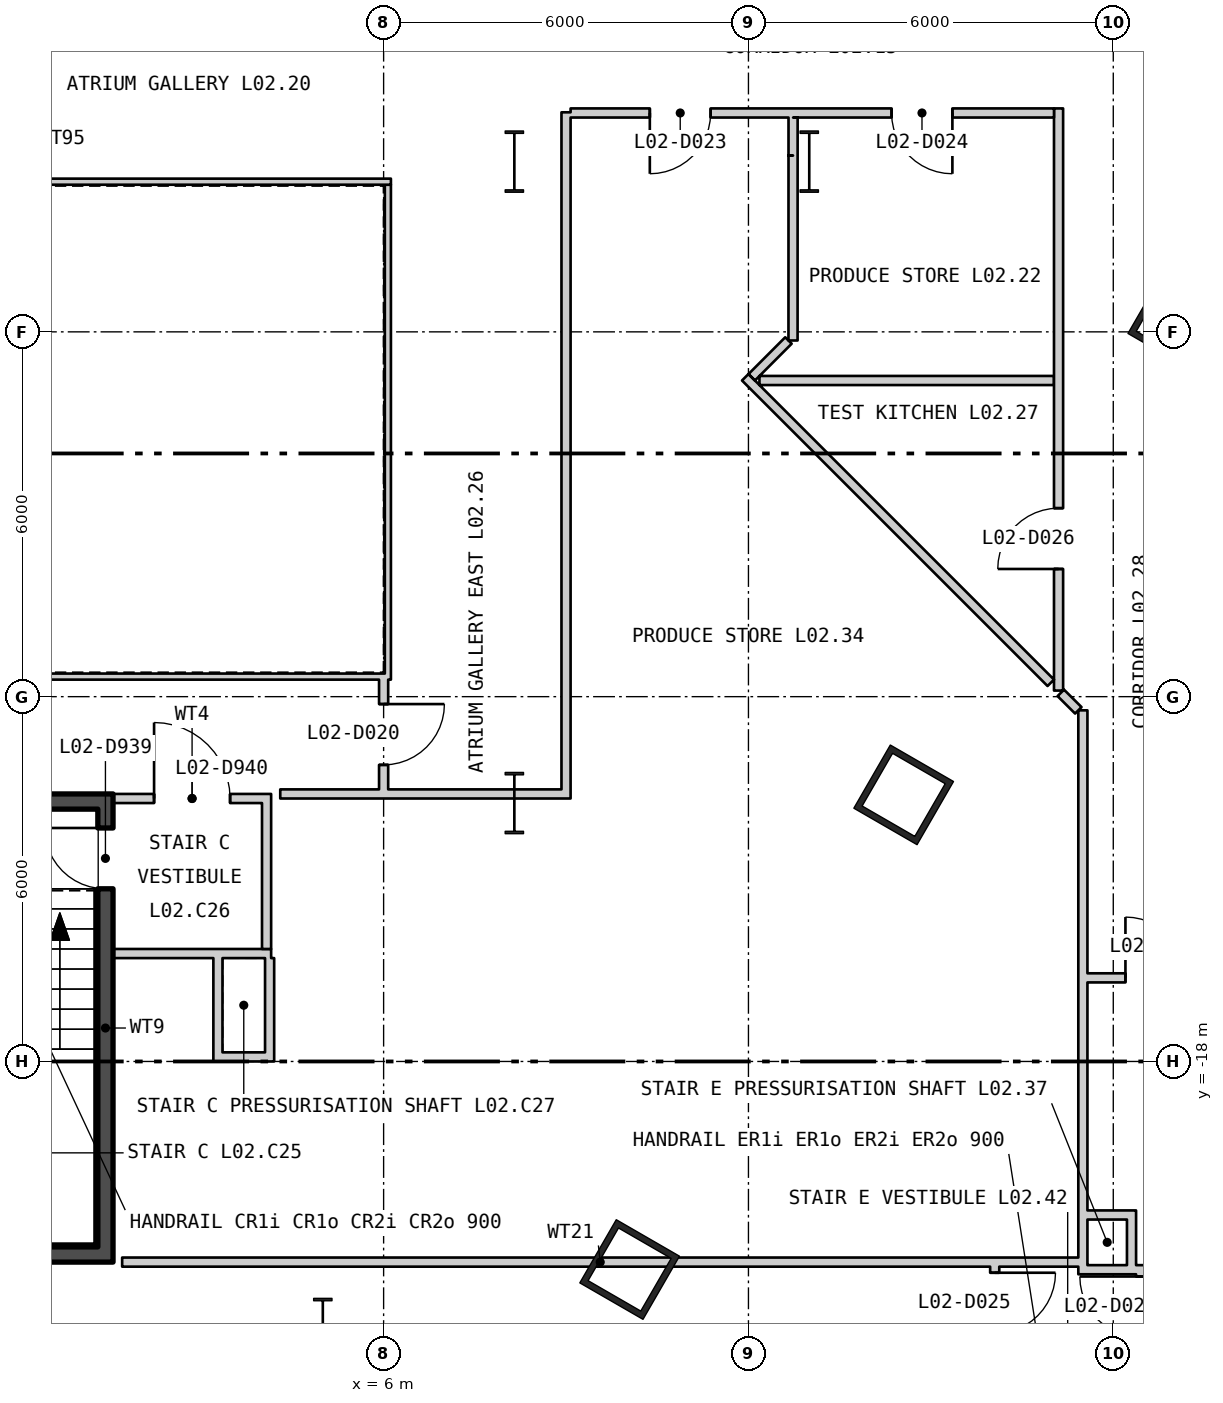
"""IFC4 building model, lengths in metres.
Left out: names, types, materials, properties, quantities, classifications, styles, units other than length and angle.
Written with IfcOpenShell. Run it as: python <this file> out.ifc"""

import sys

from ifc_helpers import new_model, si_unit, direction, frame, frame_2d, origin, origin_2d, place, context, subcontext, project, spatial, rectangle, hollow_rectangle, i_section, extrude, element, fill, save


model = new_model("IFC4")
c1 = context("Model", 3, precision=1e-05, world=origin(), true_north=direction((0.0, 1.0)))
c2 = subcontext(c1, "Body", "Model", "MODEL_VIEW")
j1 = project(units=[si_unit("LENGTHUNIT", "METRE"), si_unit("PLANEANGLEUNIT", "RADIAN")], contexts=[c1])
p1 = place(None, origin())
s1 = spatial("IfcSite", under=j1, at=p1, CompositionType="ELEMENT")
p2 = place(p1, origin())
s2 = spatial("IfcBuilding", under=s1, at=p2, CompositionType="ELEMENT")
p3 = place(p2, frame((0.0, 0.0, 13.5)))
s3 = spatial("IfcBuildingStorey", under=s2, at=p3, CompositionType="ELEMENT", Elevation=13.5)
for number, where, z_axis, x_axis in (
    (1, (10.046, -21.422, 0.0), (0.0, 0.0, 1.0), (0.5, 0.866, 0.0)),
    (2, (14.553, -13.615, 0.0), (0.0, 0.0, 1.0), (0.5, 0.866, 0.0)),
    (3, (19.061, -5.807, 0.0), (0.0, 0.0, 1.0), (0.5, 0.866, 0.0)),
):
    element("IfcColumn", number, at=place(p3, frame(where, z_axis=z_axis, x_axis=x_axis)), inside=s3, PredefinedType="COLUMN", context=c2, shape_type="SweptSolid", body=[
        extrude(hollow_rectangle(XDim=1.2, YDim=1.2, WallThickness=0.1, at=origin_2d()), origin(), (0.0, 0.0, 1.0), 5.1),
    ])
for number, where, z_axis, x_axis in (
    (4, (8.15, -3.2, 0.0), (0.0, 0.0, 1.0), (1.0, 0.0, 0.0)),
    (5, (8.15, -13.75, 0.0), (0.0, 0.0, 1.0), (1.0, 0.0, 0.0)),
    (6, (5.0, -22.4, 0.0), (0.0, 0.0, 1.0), (1.0, 0.0, 0.0)),
    (7, (13.0, -3.2, 0.0), (0.0, 0.0, 1.0), (1.0, 0.0, 0.0)),
):
    element("IfcColumn", number, at=place(p3, frame(where, z_axis=z_axis, x_axis=x_axis)), inside=s3, PredefinedType="COLUMN", context=c2, shape_type="SweptSolid", body=[
        extrude(i_section(OverallWidth=0.302, OverallDepth=1.008, WebThickness=0.021, FlangeThickness=0.04, at=origin_2d()), origin(), (0.0, 0.0, 1.0), 5.1),
    ])
p4 = place(p3, frame((-6.12, -11.67, 0.0), z_axis=(0.0, 0.0, 1.0), x_axis=(1.0, 0.0, 0.0)))
e8 = element("IfcWall", 8, at=p4, inside=s3, PredefinedType="PARTITIONING", context=c2, shape_type="SweptSolid", body=[
    extrude(rectangle(XDim=12.24, YDim=0.1, at=frame_2d((6.12, 0.0))), origin(), (0.0, 0.0, 1.0), 4.88),
])
p5 = place(p3, frame((6.07, -11.62, 0.0), z_axis=(0.0, 0.0, 1.0), x_axis=(0.0, 1.0, 0.0)))
e9 = element("IfcWall", 9, at=p5, inside=s3, PredefinedType="PARTITIONING", context=c2, shape_type="SweptSolid", body=[
    extrude(rectangle(XDim=8.04, YDim=0.1, at=frame_2d((4.02, 0.0))), origin(), (0.0, 0.0, 1.0), 4.88),
])
p6 = place(p3, frame((6.12, -3.53, 0.0), z_axis=(0.0, 0.0, 1.0), x_axis=(-1.0, 0.0, 0.0)))
e10 = element("IfcWall", 10, at=p6, inside=s3, PredefinedType="PARTITIONING", context=c2, shape_type="SweptSolid", body=[
    extrude(rectangle(XDim=12.24, YDim=0.1, at=frame_2d((6.12, 0.0))), origin(), (0.0, 0.0, 1.0), 4.88),
])
p7 = place(p3, frame((1.425, -21.05, 0.0), z_axis=(0.0, 0.0, 1.0), x_axis=(0.0, 1.0, 0.0)))
e11 = element("IfcWall", 11, at=p7, inside=s3, PredefinedType="SHEAR", context=c2, shape_type="SweptSolid", body=[
    extrude(rectangle(XDim=7.2, YDim=0.25, at=frame_2d((3.6, 0.0))), origin(), (0.0, 0.0, 1.0), 4.88),
])
p8 = place(p7, frame((5.89, 0.0, 0.0)))
e12 = element("IfcOpeningElement", 12, at=p8, cuts=e11, PredefinedType="OPENING", context=c2, shape_type="SweptSolid", body=[
    extrude(rectangle(XDim=1.0, YDim=2.1, at=frame_2d((0.5, 1.05))), frame((0.0, 0.135, 0.0), z_axis=(0.0, -1.0, 0.0), x_axis=(1.0, 0.0, 0.0)), (0.0, 0.0, 1.0), 0.27),
])
for number, where, z_axis, x_axis in (
    (13, (-1.55, -21.175, 0.0), (0.0, 0.0, 1.0), (1.0, 0.0, 0.0)),
    (14, (-1.55, -13.725, 0.0), (0.0, 0.0, 1.0), (1.0, 0.0, 0.0)),
):
    element("IfcWall", number, at=place(p3, frame(where, z_axis=z_axis, x_axis=x_axis)), inside=s3, PredefinedType="SHEAR", context=c2, shape_type="SweptSolid", body=[
        extrude(rectangle(XDim=3.1, YDim=0.25, at=frame_2d((1.55, 0.0))), origin(), (0.0, 0.0, 1.0), 4.88),
    ])
p9 = place(p3, frame((1.55, -16.225, 0.0), z_axis=(0.0, 0.0, 1.0), x_axis=(1.0, 0.0, 0.0)))
e15 = element("IfcWall", 15, at=p9, inside=s3, PredefinedType="PARTITIONING", context=c2, shape_type="SweptSolid", body=[
    extrude(rectangle(XDim=2.6, YDim=0.15, at=frame_2d((1.3, 0.0))), origin(), (0.0, 0.0, 1.0), 4.88),
])
p10 = place(p3, frame((4.075, -16.15, 0.0), z_axis=(0.0, 0.0, 1.0), x_axis=(0.0, 1.0, 0.0)))
e16 = element("IfcWall", 16, at=p10, inside=s3, PredefinedType="PARTITIONING", context=c2, shape_type="SweptSolid", body=[
    extrude(rectangle(XDim=2.4, YDim=0.15, at=frame_2d((1.2, 0.0))), origin(), (0.0, 0.0, 1.0), 4.88),
])
p11 = place(p3, frame((1.55, -13.675, 0.0), z_axis=(0.0, 0.0, 1.0), x_axis=(1.0, 0.0, 0.0)))
e17 = element("IfcWall", 17, at=p11, inside=s3, PredefinedType="PARTITIONING", context=c2, shape_type="SweptSolid", body=[
    extrude(rectangle(XDim=2.6, YDim=0.15, at=frame_2d((1.3, 0.0))), origin(), (0.0, 0.0, 1.0), 3.97),
])
p12 = place(p11, frame((0.675, 0.0, 0.0)))
e18 = element("IfcOpeningElement", 18, at=p12, cuts=e17, PredefinedType="OPENING", context=c2, shape_type="SweptSolid", body=[
    extrude(rectangle(XDim=1.25, YDim=2.1, at=frame_2d((0.625, 1.05))), frame((0.0, 0.085, 0.0), z_axis=(0.0, -1.0, 0.0), x_axis=(1.0, 0.0, 0.0)), (0.0, 0.0, 1.0), 0.17),
])
p13 = place(p3, frame((3.275, -18.0, 0.0), z_axis=(0.0, 0.0, 1.0), x_axis=(0.0, 1.0, 0.0)))
e19 = element("IfcWall", 19, at=p13, inside=s3, PredefinedType="PARTITIONING", context=c2, shape_type="SweptSolid", body=[
    extrude(rectangle(XDim=1.7, YDim=0.15, at=frame_2d((0.85, 0.0))), origin(), (0.0, 0.0, 1.0), 4.28),
])
p14 = place(p3, frame((3.35, -17.925, 0.0), z_axis=(0.0, 0.0, 1.0), x_axis=(1.0, 0.0, 0.0)))
e20 = element("IfcWall", 20, at=p14, inside=s3, PredefinedType="PARTITIONING", context=c2, shape_type="SweptSolid", body=[
    extrude(rectangle(XDim=0.7, YDim=0.15, at=frame_2d((0.35, 0.0))), origin(), (0.0, 0.0, 1.0), 4.88),
])
p15 = place(p3, frame((4.125, -18.0, 0.0), z_axis=(0.0, 0.0, 1.0), x_axis=(0.0, 1.0, 0.0)))
e21 = element("IfcWall", 21, at=p15, inside=s3, PredefinedType="PARTITIONING", context=c2, shape_type="SweptSolid", body=[
    extrude(rectangle(XDim=1.7, YDim=0.15, at=frame_2d((0.85, 0.0))), origin(), (0.0, 0.0, 1.0), 4.88),
])
p16 = place(p3, frame((1.7, -21.3, 0.0), z_axis=(0.0, 0.0, 1.0), x_axis=(1.0, 0.0, 0.0)))
e22 = element("IfcWall", 22, at=p16, inside=s3, PredefinedType="PARTITIONING", context=c2, shape_type="SweptSolid", body=[
    extrude(rectangle(XDim=15.725, YDim=0.15, at=frame_2d((7.862, 0.0))), origin(), (0.0, 0.0, 1.0), 4.88),
])
p17 = place(p3, frame((4.3, -13.6, 0.0), z_axis=(0.0, 0.0, 1.0), x_axis=(1.0, 0.0, 0.0)))
e23 = element("IfcWall", 23, at=p17, inside=s3, PredefinedType="PARTITIONING", context=c2, shape_type="SweptSolid", body=[
    extrude(rectangle(XDim=3.85, YDim=0.15, at=frame_2d((1.925, 0.0))), origin(), (0.0, 0.0, 1.0), 3.97),
])
p18 = place(p3, frame((8.15, -13.6, 0.0), z_axis=(0.0, 0.0, 1.0), x_axis=(1.0, 0.0, 0.0)))
e24 = element("IfcWall", 24, at=p18, inside=s3, PredefinedType="PARTITIONING", context=c2, shape_type="SweptSolid", body=[
    extrude(rectangle(XDim=0.775, YDim=0.15, at=frame_2d((0.388, 0.0))), origin(), (0.0, 0.0, 1.0), 4.09),
])
p19 = place(p3, frame((6.0, -13.525, 0.0), z_axis=(0.0, 0.0, 1.0), x_axis=(0.0, 1.0, 0.0)))
e25 = element("IfcWall", 25, at=p19, inside=s3, PredefinedType="PARTITIONING", context=c2, shape_type="SweptSolid", body=[
    extrude(rectangle(XDim=1.805, YDim=0.15, at=frame_2d((0.902, 0.0))), origin(), (0.0, 0.0, 1.0), 4.88),
])
p20 = place(p19, frame((0.403, 0.0, 0.0)))
e26 = element("IfcOpeningElement", 26, at=p20, cuts=e25, PredefinedType="OPENING", context=c2, shape_type="SweptSolid", body=[
    extrude(rectangle(XDim=1.0, YDim=2.1, at=frame_2d((0.5, 1.05))), frame((0.0, 0.085, 0.0), z_axis=(0.0, -1.0, 0.0), x_axis=(1.0, 0.0, 0.0)), (0.0, 0.0, 1.0), 0.17),
])
p21 = place(p3, frame((9.0, -13.675, 0.0), z_axis=(0.0, 0.0, 1.0), x_axis=(0.0, 1.0, 0.0)))
e27 = element("IfcWall", 27, at=p21, inside=s3, PredefinedType="PARTITIONING", context=c2, shape_type="SweptSolid", body=[
    extrude(rectangle(XDim=11.286, YDim=0.15, at=frame_2d((5.643, 0.0))), origin(), (0.0, 0.0, 1.0), 4.88),
])
p22 = place(p3, frame((9.075, -2.4, 0.0), z_axis=(0.0, 0.0, 1.0), x_axis=(1.0, 0.0, 0.0)))
e28 = element("IfcWall", 28, at=p22, inside=s3, PredefinedType="PARTITIONING", context=c2, shape_type="SweptSolid", body=[
    extrude(rectangle(XDim=7.95, YDim=0.15, at=frame_2d((3.975, 0.0))), origin(), (0.0, 0.0, 1.0), 4.88),
])
p23 = place(p22, frame((1.303, 0.0, 0.0)))
e29 = element("IfcOpeningElement", 29, at=p23, cuts=e28, PredefinedType="OPENING", context=c2, shape_type="SweptSolid", body=[
    extrude(rectangle(XDim=1.0, YDim=2.1, at=frame_2d((0.5, 1.05))), frame((0.0, 0.085, 0.0), z_axis=(0.0, -1.0, 0.0), x_axis=(1.0, 0.0, 0.0)), (0.0, 0.0, 1.0), 0.17),
])
p24 = place(p22, frame((5.279, 0.0, 0.0)))
e30 = element("IfcOpeningElement", 30, at=p24, cuts=e28, PredefinedType="OPENING", context=c2, shape_type="SweptSolid", body=[
    extrude(rectangle(XDim=1.0, YDim=2.1, at=frame_2d((0.5, 1.05))), frame((0.0, 0.085, 0.0), z_axis=(0.0, -1.0, 0.0), x_axis=(1.0, 0.0, 0.0)), (0.0, 0.0, 1.0), 0.17),
])
p25 = place(p3, frame((11.947, -6.747, 0.0), z_axis=(0.0, 0.0, 1.0), x_axis=(0.707106781187, -0.707106781187, 0.0)))
e31 = element("IfcWall", 31, at=p25, inside=s3, PredefinedType="PARTITIONING", context=c2, shape_type="SweptSolid", body=[
    extrude(rectangle(XDim=7.106, YDim=0.15, at=frame_2d((3.553, 0.0))), origin(), (0.0, 0.0, 1.0), 4.88),
])
p26 = place(p3, frame((12.054, -6.747, 0.0), z_axis=(0.0, 0.0, 1.0), x_axis=(0.706521670373, 0.707691408238, 0.0)))
e32 = element("IfcWall", 32, at=p26, inside=s3, PredefinedType="PARTITIONING", context=c2, shape_type="SweptSolid", body=[
    extrude(rectangle(XDim=0.855, YDim=0.15, at=frame_2d((0.427, 0.0))), origin(), (0.0, 0.0, 1.0), 4.88),
])
p27 = place(p3, frame((12.181, -6.8, 0.0), z_axis=(0.0, 0.0, 1.0), x_axis=(1.0, 0.0, 0.0)))
e33 = element("IfcWall", 33, at=p27, inside=s3, PredefinedType="PARTITIONING", context=c2, shape_type="SweptSolid", body=[
    extrude(rectangle(XDim=4.844, YDim=0.15, at=frame_2d((2.422, 0.0))), origin(), (0.0, 0.0, 1.0), 4.88),
])
p28 = place(p3, frame((12.733, -6.142, 0.0), z_axis=(0.0, 0.0, 1.0), x_axis=(0.000262984869, 0.999999965419, 0.0)))
e34 = element("IfcWall", 34, at=p28, inside=s3, PredefinedType="PARTITIONING", context=c2, shape_type="SweptSolid", body=[
    extrude(rectangle(XDim=3.042, YDim=0.15, at=frame_2d((1.521, 0.0))), origin(), (0.0, 0.0, 1.0), 4.19),
])
p29 = place(p3, frame((12.734, -3.1, 0.0), z_axis=(0.0, 0.0, 1.0), x_axis=(0.000319999984, 0.9999999488, 0.0)))
e35 = element("IfcWall", 35, at=p29, inside=s3, PredefinedType="PARTITIONING", context=c2, shape_type="SweptSolid", body=[
    extrude(rectangle(XDim=0.625, YDim=0.15, at=frame_2d((0.312, 0.0))), origin(), (0.0, 0.0, 1.0), 4.28),
])
p30 = place(p3, frame((16.05, -23.55, 0.0), z_axis=(0.0, 0.0, 1.0), x_axis=(0.0, 1.0, 0.0)))
e36 = element("IfcWall", 36, at=p30, inside=s3, PredefinedType="PARTITIONING", context=c2, shape_type="SweptSolid", body=[
    extrude(rectangle(XDim=2.175, YDim=0.15, at=frame_2d((1.087, 0.0))), origin(), (0.0, 0.0, 1.0), 4.88),
])
p31 = place(p30, frame((1.075, 0.0, 0.0)))
e37 = element("IfcOpeningElement", 37, at=p31, cuts=e36, PredefinedType="OPENING", context=c2, shape_type="SweptSolid", body=[
    extrude(rectangle(XDim=1.0, YDim=2.1, at=frame_2d((0.5, 1.05))), frame((0.0, 0.085, 0.0), z_axis=(0.0, -1.0, 0.0), x_axis=(1.0, 0.0, 0.0)), (0.0, 0.0, 1.0), 0.17),
])
p32 = place(p3, frame((17.1, -11.9, 0.0), z_axis=(0.0, 0.0, 1.0), x_axis=(0.0, 1.0, 0.0)))
e38 = element("IfcWall", 38, at=p32, inside=s3, PredefinedType="PARTITIONING", context=c2, shape_type="SweptSolid", body=[
    extrude(rectangle(XDim=9.575, YDim=0.15, at=frame_2d((4.787, 0.0))), origin(), (0.0, 0.0, 1.0), 4.88),
])
p33 = place(p32, frame((2.0, 0.0, 0.0)))
e39 = element("IfcOpeningElement", 39, at=p33, cuts=e38, PredefinedType="OPENING", context=c2, shape_type="SweptSolid", body=[
    extrude(rectangle(XDim=1.0, YDim=2.1, at=frame_2d((0.5, 1.05))), frame((0.0, 0.085, 0.0), z_axis=(0.0, -1.0, 0.0), x_axis=(1.0, 0.0, 0.0)), (0.0, 0.0, 1.0), 0.17),
])
p34 = place(p3, frame((17.137, -11.938, 0.0), z_axis=(0.0, 0.0, 1.0), x_axis=(0.708335460904, -0.705875962776, 0.0)))
e40 = element("IfcWall", 40, at=p34, inside=s3, PredefinedType="PARTITIONING", context=c2, shape_type="SweptSolid", body=[
    extrude(rectangle(XDim=0.407, YDim=0.15, at=frame_2d((0.203, 0.0))), origin(), (0.0, 0.0, 1.0), 4.88),
])
p35 = place(p3, frame((17.5, -21.5, 0.0), z_axis=(0.0, 0.0, 1.0), x_axis=(0.0, 1.0, 0.0)))
e41 = element("IfcWall", 41, at=p35, inside=s3, PredefinedType="PARTITIONING", context=c2, shape_type="SweptSolid", body=[
    extrude(rectangle(XDim=0.987, YDim=0.15, at=frame_2d((0.493, 0.0))), origin(), (0.0, 0.0, 1.0), 4.88),
])
p36 = place(p3, frame((17.5, -20.513, 0.0), z_axis=(0.0, 0.0, 1.0), x_axis=(0.0, 1.0, 0.0)))
e42 = element("IfcWall", 42, at=p36, inside=s3, PredefinedType="PARTITIONING", context=c2, shape_type="SweptSolid", body=[
    extrude(rectangle(XDim=8.288, YDim=0.15, at=frame_2d((4.144, 0.0))), origin(), (0.0, 0.0, 1.0), 4.88),
])
for number, where, z_axis, x_axis in (
    (43, (17.575, -21.425, 0.0), (0.0, 0.0, 1.0), (1.0, 0.0, 0.0)),
    (44, (17.575, -20.525, 0.0), (0.0, 0.0, 1.0), (1.0, 0.0, 0.0)),
):
    element("IfcWall", number, at=place(p3, frame(where, z_axis=z_axis, x_axis=x_axis)), inside=s3, PredefinedType="PARTITIONING", context=c2, shape_type="SweptSolid", body=[
        extrude(rectangle(XDim=0.65, YDim=0.15, at=frame_2d((0.325, 0.0))), origin(), (0.0, 0.0, 1.0), 4.88),
    ])
p37 = place(p3, frame((17.575, -16.625, 0.0), z_axis=(0.0, 0.0, 1.0), x_axis=(1.0, 0.0, 0.0)))
e45 = element("IfcWall", 45, at=p37, inside=s3, PredefinedType="PARTITIONING", context=c2, shape_type="SweptSolid", body=[
    extrude(rectangle(XDim=2.25, YDim=0.15, at=frame_2d((1.125, 0.0))), origin(), (0.0, 0.0, 1.0), 4.88),
])
p38 = place(p37, frame((0.625, 0.0, 0.0)))
e46 = element("IfcOpeningElement", 46, at=p38, cuts=e45, PredefinedType="OPENING", context=c2, shape_type="SweptSolid", body=[
    extrude(rectangle(XDim=1.0, YDim=2.1, at=frame_2d((0.5, 1.05))), frame((0.0, 0.085, 0.0), z_axis=(0.0, -1.0, 0.0), x_axis=(1.0, 0.0, 0.0)), (0.0, 0.0, 1.0), 0.17),
])
p39 = place(p3, frame((18.3, -21.5, 0.0), z_axis=(0.0, 0.0, 1.0), x_axis=(0.0, 1.0, 0.0)))
e47 = element("IfcWall", 47, at=p39, inside=s3, PredefinedType="PARTITIONING", context=c2, shape_type="SweptSolid", body=[
    extrude(rectangle(XDim=1.05, YDim=0.15, at=frame_2d((0.525, 0.0))), origin(), (0.0, 0.0, 1.0), 4.88),
])
p40 = place(p3, frame((18.45, -23.55, 0.0), z_axis=(0.0, 0.0, 1.0), x_axis=(0.0, 1.0, 0.0)))
e48 = element("IfcWall", 48, at=p40, inside=s3, PredefinedType="PARTITIONING", context=c2, shape_type="SweptSolid", body=[
    extrude(rectangle(XDim=2.2, YDim=0.15, at=frame_2d((1.1, 0.0))), origin(), (0.0, 0.0, 1.0), 4.88),
])
p41 = place(p40, frame((1.013, 0.0, 0.0)))
e49 = element("IfcOpeningElement", 49, at=p41, cuts=e48, PredefinedType="OPENING", context=c2, shape_type="SweptSolid", body=[
    extrude(rectangle(XDim=1.0, YDim=2.1, at=frame_2d((0.5, 1.05))), frame((0.0, 0.085, 0.0), z_axis=(0.0, -1.0, 0.0), x_axis=(1.0, 0.0, 0.0)), (0.0, 0.0, 1.0), 0.17),
])
p42 = place(p8, origin())
e50 = element("IfcDoor", 50, at=p42, inside=s3, OperationType="SINGLE_SWING_LEFT", PredefinedType="DOOR", context=c2, shape_type="SweptSolid", body=[
    extrude(rectangle(XDim=1.0, YDim=2.1, at=frame_2d((0.5, 1.05))), frame((0.0, 0.025, 0.0), z_axis=(0.0, -1.0, 0.0), x_axis=(1.0, 0.0, 0.0)), (0.0, 0.0, 1.0), 0.05),
])
fill(e12, e50)
p43 = place(p12, origin())
e51 = element("IfcDoor", 51, at=p43, inside=s3, OperationType="SINGLE_SWING_RIGHT", PredefinedType="DOOR", context=c2, shape_type="SweptSolid", body=[
    extrude(rectangle(XDim=1.25, YDim=2.1, at=frame_2d((0.625, 1.05))), frame((0.0, 0.025, 0.0), z_axis=(0.0, -1.0, 0.0), x_axis=(1.0, 0.0, 0.0)), (0.0, 0.0, 1.0), 0.05),
])
fill(e18, e51)
p44 = place(p20, origin())
e52 = element("IfcDoor", 52, at=p44, inside=s3, OperationType="SINGLE_SWING_RIGHT", PredefinedType="DOOR", context=c2, shape_type="SweptSolid", body=[
    extrude(rectangle(XDim=1.0, YDim=2.1, at=frame_2d((0.5, 1.05))), frame((0.0, 0.025, 0.0), z_axis=(0.0, -1.0, 0.0), x_axis=(1.0, 0.0, 0.0)), (0.0, 0.0, 1.0), 0.05),
])
fill(e26, e52)
p45 = place(p23, origin())
e53 = element("IfcDoor", 53, at=p45, inside=s3, OperationType="SINGLE_SWING_LEFT", PredefinedType="DOOR", context=c2, shape_type="SweptSolid", body=[
    extrude(rectangle(XDim=1.0, YDim=2.1, at=frame_2d((0.5, 1.05))), frame((0.0, 0.025, 0.0), z_axis=(0.0, -1.0, 0.0), x_axis=(1.0, 0.0, 0.0)), (0.0, 0.0, 1.0), 0.05),
])
fill(e29, e53)
p46 = place(p24, origin())
e54 = element("IfcDoor", 54, at=p46, inside=s3, OperationType="SINGLE_SWING_RIGHT", PredefinedType="DOOR", context=c2, shape_type="SweptSolid", body=[
    extrude(rectangle(XDim=1.0, YDim=2.1, at=frame_2d((0.5, 1.05))), frame((0.0, 0.025, 0.0), z_axis=(0.0, -1.0, 0.0), x_axis=(1.0, 0.0, 0.0)), (0.0, 0.0, 1.0), 0.05),
])
fill(e30, e54)
p47 = place(p31, origin())
e55 = element("IfcDoor", 55, at=p47, inside=s3, OperationType="SINGLE_SWING_RIGHT", PredefinedType="DOOR", context=c2, shape_type="SweptSolid", body=[
    extrude(rectangle(XDim=1.0, YDim=2.1, at=frame_2d((0.5, 1.05))), frame((0.0, 0.025, 0.0), z_axis=(0.0, -1.0, 0.0), x_axis=(1.0, 0.0, 0.0)), (0.0, 0.0, 1.0), 0.05),
])
fill(e37, e55)
p48 = place(p33, origin())
e56 = element("IfcDoor", 56, at=p48, inside=s3, OperationType="SINGLE_SWING_RIGHT", PredefinedType="DOOR", context=c2, shape_type="SweptSolid", body=[
    extrude(rectangle(XDim=1.0, YDim=2.1, at=frame_2d((0.5, 1.05))), frame((0.0, 0.025, 0.0), z_axis=(0.0, -1.0, 0.0), x_axis=(1.0, 0.0, 0.0)), (0.0, 0.0, 1.0), 0.05),
])
fill(e39, e56)
p49 = place(p38, origin())
e57 = element("IfcDoor", 57, at=p49, inside=s3, OperationType="SINGLE_SWING_RIGHT", PredefinedType="DOOR", context=c2, shape_type="SweptSolid", body=[
    extrude(rectangle(XDim=1.0, YDim=2.1, at=frame_2d((0.5, 1.05))), frame((0.0, 0.025, 0.0), z_axis=(0.0, -1.0, 0.0), x_axis=(1.0, 0.0, 0.0)), (0.0, 0.0, 1.0), 0.05),
])
fill(e46, e57)
p50 = place(p41, origin())
e58 = element("IfcDoor", 58, at=p50, inside=s3, OperationType="SINGLE_SWING_LEFT", PredefinedType="DOOR", context=c2, shape_type="SweptSolid", body=[
    extrude(rectangle(XDim=1.0, YDim=2.1, at=frame_2d((0.5, 1.05))), frame((0.0, 0.025, 0.0), z_axis=(0.0, -1.0, 0.0), x_axis=(1.0, 0.0, 0.0)), (0.0, 0.0, 1.0), 0.05),
])
fill(e49, e58)
save(model, sys.argv[1])
